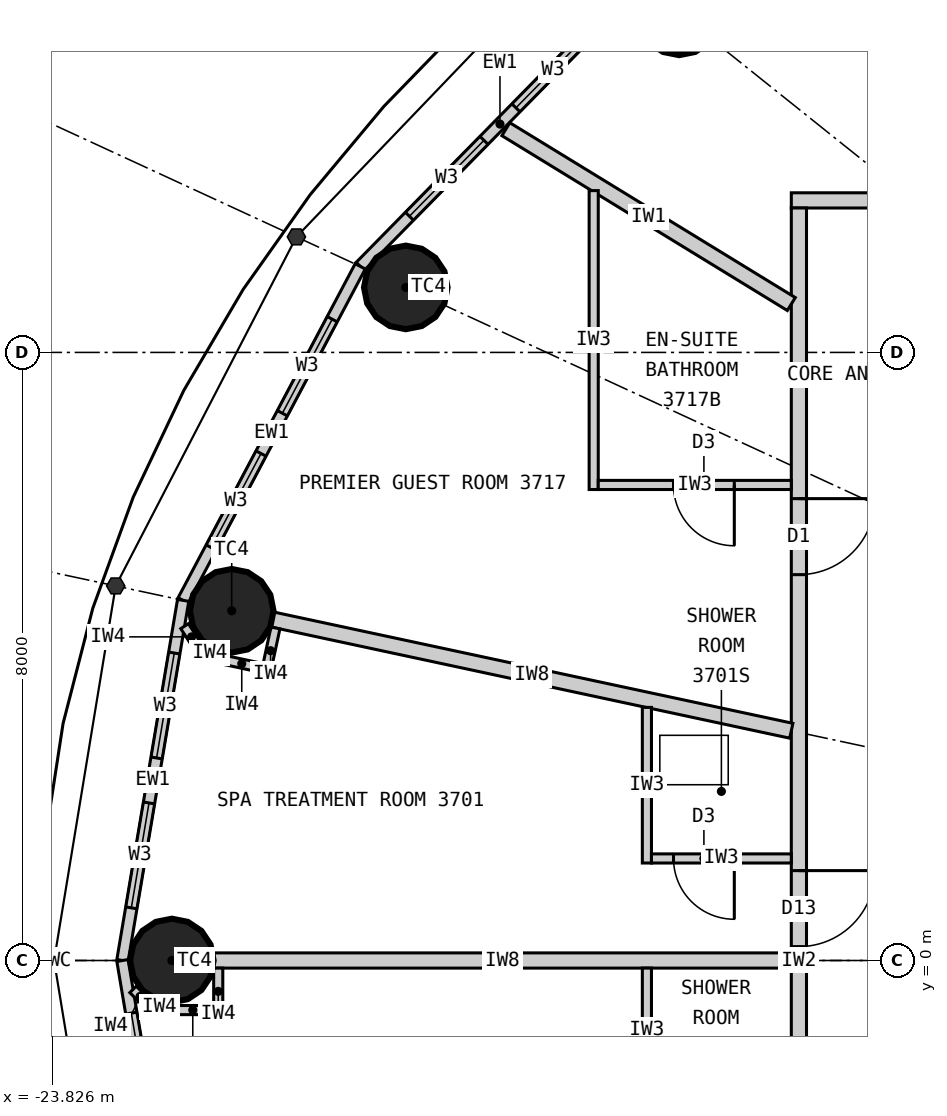
"""IFC4 building model, lengths in metres.
Left out: names, types, materials, properties, quantities, classifications, styles, units other than length and angle.
Written with IfcOpenShell. Run it as: python <this file> out.ifc"""

import sys

from ifc_helpers import new_model, si_unit, direction, frame, frame_2d, origin, origin_2d, place, context, subcontext, project, spatial, rectangle, circle, extrude, element, fill, save


model = new_model("IFC4")
c1 = context("Model", 3, precision=1e-05, world=origin(), true_north=direction((0.0, 1.0)))
c2 = subcontext(c1, "Body", "Model", "MODEL_VIEW")
j1 = project(units=[si_unit("LENGTHUNIT", "METRE"), si_unit("PLANEANGLEUNIT", "RADIAN")], contexts=[c1])
p1 = place(None, origin())
s1 = spatial("IfcSite", under=j1, at=p1, CompositionType="ELEMENT")
p2 = place(p1, origin())
s2 = spatial("IfcBuilding", under=s1, at=p2, CompositionType="ELEMENT")
p3 = place(p2, frame((0.0, 0.0, 143.4)))
s3 = spatial("IfcBuildingStorey", under=s2, at=p3, CompositionType="ELEMENT", Elevation=143.4)
for number, where, z_axis, x_axis in (
    (1, (-15.576, 12.461, 0.0), (0.0, 0.0, 1.0), (1.0, 0.0, 0.0)),
    (2, (-19.172, 8.855, 0.0), (0.0, 0.0, 1.0), (1.0, 0.0, 0.0)),
    (3, (-21.463, 4.601, 0.0), (0.0, 0.0, 1.0), (1.0, 0.0, 0.0)),
    (4, (-22.25, 0.0, 0.0), (0.0, 0.0, 1.0), (1.0, 0.0, 0.0)),
):
    element("IfcColumn", number, at=place(p3, frame(where, z_axis=z_axis, x_axis=x_axis)), inside=s3, PredefinedType="COLUMN", context=c2, shape_type="SweptSolid", body=[
        extrude(circle(Radius=0.55, at=origin_2d()), origin(), (0.0, 0.0, 1.0), 3.3),
    ])
p4 = place(p3, frame((-16.095, 12.876, 0.0), z_axis=(0.0, 0.0, 1.0), x_axis=(-0.700727467776, -0.71342905457, 0.0)))
e5 = element("IfcWall", 5, at=p4, inside=s3, PredefinedType="ELEMENTEDWALL", context=c2, shape_type="SweptSolid", body=[
    extrude(rectangle(XDim=5.247, YDim=0.15, at=frame_2d((2.624, 0.0))), origin(), (0.0, 0.0, 1.0), 3.12),
])
p5 = place(p4, frame((0.924, 0.0, 0.9)))
e6 = element("IfcOpeningElement", 6, at=p5, cuts=e5, PredefinedType="OPENING", context=c2, shape_type="SweptSolid", body=[
    extrude(rectangle(XDim=1.4, YDim=1.9, at=frame_2d((0.7, 0.95))), frame((0.0, 0.085, 0.0), z_axis=(0.0, -1.0, 0.0), x_axis=(1.0, 0.0, 0.0)), (0.0, 0.0, 1.0), 0.17),
])
p6 = place(p4, frame((2.924, 0.0, 0.9)))
e7 = element("IfcOpeningElement", 7, at=p6, cuts=e5, PredefinedType="OPENING", context=c2, shape_type="SweptSolid", body=[
    extrude(rectangle(XDim=1.4, YDim=1.9, at=frame_2d((0.7, 0.95))), frame((0.0, 0.085, 0.0), z_axis=(0.0, -1.0, 0.0), x_axis=(1.0, 0.0, 0.0)), (0.0, 0.0, 1.0), 0.17),
])
p7 = place(p3, frame((-19.772, 9.132, 0.0), z_axis=(0.0, 0.0, 1.0), x_axis=(-0.468428906714, -0.883501193748, 0.0)))
e8 = element("IfcWall", 8, at=p7, inside=s3, PredefinedType="ELEMENTEDWALL", context=c2, shape_type="SweptSolid", body=[
    extrude(rectangle(XDim=4.974, YDim=0.15, at=frame_2d((2.487, 0.0))), origin(), (0.0, 0.0, 1.0), 3.12),
])
p8 = place(p7, frame((0.787, 0.0, 0.9)))
e9 = element("IfcOpeningElement", 9, at=p8, cuts=e8, PredefinedType="OPENING", context=c2, shape_type="SweptSolid", body=[
    extrude(rectangle(XDim=1.4, YDim=1.9, at=frame_2d((0.7, 0.95))), frame((0.0, 0.085, 0.0), z_axis=(0.0, -1.0, 0.0), x_axis=(1.0, 0.0, 0.0)), (0.0, 0.0, 1.0), 0.17),
])
p9 = place(p7, frame((2.787, 0.0, 0.9)))
e10 = element("IfcOpeningElement", 10, at=p9, cuts=e8, PredefinedType="OPENING", context=c2, shape_type="SweptSolid", body=[
    extrude(rectangle(XDim=1.4, YDim=1.9, at=frame_2d((0.7, 0.95))), frame((0.0, 0.085, 0.0), z_axis=(0.0, -1.0, 0.0), x_axis=(1.0, 0.0, 0.0)), (0.0, 0.0, 1.0), 0.17),
])
p10 = place(p3, frame((-22.102, 4.738, 0.0), z_axis=(0.0, 0.0, 1.0), x_axis=(-0.166162111254, -0.986098449843, 0.0)))
e11 = element("IfcWall", 11, at=p10, inside=s3, PredefinedType="ELEMENTEDWALL", context=c2, shape_type="SweptSolid", body=[
    extrude(rectangle(XDim=4.805, YDim=0.15, at=frame_2d((2.402, 0.0))), origin(), (0.0, 0.0, 1.0), 3.12),
])
p11 = place(p10, frame((0.702, 0.0, 0.9)))
e12 = element("IfcOpeningElement", 12, at=p11, cuts=e11, PredefinedType="OPENING", context=c2, shape_type="SweptSolid", body=[
    extrude(rectangle(XDim=1.4, YDim=1.9, at=frame_2d((0.7, 0.95))), frame((0.0, 0.085, 0.0), z_axis=(0.0, -1.0, 0.0), x_axis=(1.0, 0.0, 0.0)), (0.0, 0.0, 1.0), 0.17),
])
p12 = place(p10, frame((2.702, 0.0, 0.9)))
e13 = element("IfcOpeningElement", 13, at=p12, cuts=e11, PredefinedType="OPENING", context=c2, shape_type="SweptSolid", body=[
    extrude(rectangle(XDim=1.4, YDim=1.9, at=frame_2d((0.7, 0.95))), frame((0.0, 0.085, 0.0), z_axis=(0.0, -1.0, 0.0), x_axis=(1.0, 0.0, 0.0)), (0.0, 0.0, 1.0), 0.17),
])
p13 = place(p3, frame((-22.9, 0.0, 0.0), z_axis=(0.0, 0.0, 1.0), x_axis=(0.166162111254, -0.986098449843, 0.0)))
e14 = element("IfcWall", 14, at=p13, inside=s3, PredefinedType="ELEMENTEDWALL", context=c2, shape_type="SweptSolid", body=[
    extrude(rectangle(XDim=4.805, YDim=0.15, at=frame_2d((2.402, 0.0))), origin(), (0.0, 0.0, 1.0), 3.12),
])
p14 = place(p13, frame((0.702, 0.0, 0.9)))
e15 = element("IfcOpeningElement", 15, at=p14, cuts=e14, PredefinedType="OPENING", context=c2, shape_type="SweptSolid", body=[
    extrude(rectangle(XDim=1.4, YDim=1.9, at=frame_2d((0.7, 0.95))), frame((0.0, 0.085, 0.0), z_axis=(0.0, -1.0, 0.0), x_axis=(1.0, 0.0, 0.0)), (0.0, 0.0, 1.0), 0.17),
])
p15 = place(p13, frame((2.702, 0.0, 0.9)))
e16 = element("IfcOpeningElement", 16, at=p15, cuts=e14, PredefinedType="OPENING", context=c2, shape_type="SweptSolid", body=[
    extrude(rectangle(XDim=1.4, YDim=1.9, at=frame_2d((0.7, 0.95))), frame((0.0, 0.085, 0.0), z_axis=(0.0, -1.0, 0.0), x_axis=(1.0, 0.0, 0.0)), (0.0, 0.0, 1.0), 0.17),
])
p16 = place(p3, frame((-14.1, 10.0, 0.0), z_axis=(0.0, 0.0, 1.0), x_axis=(1.0, 0.0, 0.0)))
e17 = element("IfcWall", 17, at=p16, inside=s3, PredefinedType="PARTITIONING", context=c2, shape_type="SweptSolid", body=[
    extrude(rectangle(XDim=28.2, YDim=0.2, at=frame_2d((14.1, 0.0))), origin(), (0.0, 0.0, 1.0), 3.12),
])
p17 = place(p16, frame((23.045, 0.0, 0.0)))
e18 = element("IfcOpeningElement", 18, at=p17, cuts=e17, PredefinedType="OPENING", context=c2, shape_type="SweptSolid", body=[
    extrude(rectangle(XDim=1.0, YDim=2.2, at=frame_2d((0.5, 1.1))), frame((0.0, 0.11, 0.0), z_axis=(0.0, -1.0, 0.0), x_axis=(1.0, 0.0, 0.0)), (0.0, 0.0, 1.0), 0.22),
])
p18 = place(p16, frame((17.829, 0.0, 0.0)))
e19 = element("IfcOpeningElement", 19, at=p18, cuts=e17, PredefinedType="OPENING", context=c2, shape_type="SweptSolid", body=[
    extrude(rectangle(XDim=1.0, YDim=2.2, at=frame_2d((0.5, 1.1))), frame((0.0, 0.11, 0.0), z_axis=(0.0, -1.0, 0.0), x_axis=(1.0, 0.0, 0.0)), (0.0, 0.0, 1.0), 0.22),
])
p19 = place(p16, frame((12.205, 0.0, 0.0)))
e20 = element("IfcOpeningElement", 20, at=p19, cuts=e17, PredefinedType="OPENING", context=c2, shape_type="SweptSolid", body=[
    extrude(rectangle(XDim=1.0, YDim=2.2, at=frame_2d((0.5, 1.1))), frame((0.0, 0.11, 0.0), z_axis=(0.0, -1.0, 0.0), x_axis=(1.0, 0.0, 0.0)), (0.0, 0.0, 1.0), 0.22),
])
p20 = place(p16, frame((7.857, 0.0, 0.0)))
e21 = element("IfcOpeningElement", 21, at=p20, cuts=e17, PredefinedType="OPENING", context=c2, shape_type="SweptSolid", body=[
    extrude(rectangle(XDim=1.0, YDim=2.2, at=frame_2d((0.5, 1.1))), frame((0.0, 0.11, 0.0), z_axis=(0.0, -1.0, 0.0), x_axis=(1.0, 0.0, 0.0)), (0.0, 0.0, 1.0), 0.22),
])
p21 = place(p16, frame((2.801, 0.0, 0.0)))
e22 = element("IfcOpeningElement", 22, at=p21, cuts=e17, PredefinedType="OPENING", context=c2, shape_type="SweptSolid", body=[
    extrude(rectangle(XDim=1.0, YDim=2.2, at=frame_2d((0.5, 1.1))), frame((0.0, 0.11, 0.0), z_axis=(0.0, -1.0, 0.0), x_axis=(1.0, 0.0, 0.0)), (0.0, 0.0, 1.0), 0.22),
])
p22 = place(p3, frame((-14.0, 9.9, 0.0), z_axis=(0.0, 0.0, 1.0), x_axis=(0.0, -1.0, 0.0)))
e23 = element("IfcWall", 23, at=p22, inside=s3, PredefinedType="PARTITIONING", context=c2, shape_type="SweptSolid", body=[
    extrude(rectangle(XDim=19.8, YDim=0.2, at=frame_2d((9.9, 0.0))), origin(), (0.0, 0.0, 1.0), 3.12),
])
p23 = place(p22, frame((8.718, 0.0, 0.0)))
e24 = element("IfcOpeningElement", 24, at=p23, cuts=e23, PredefinedType="OPENING", context=c2, shape_type="SweptSolid", body=[
    extrude(rectangle(XDim=1.0, YDim=2.2, at=frame_2d((0.5, 1.1))), frame((0.0, 0.11, 0.0), z_axis=(0.0, -1.0, 0.0), x_axis=(1.0, 0.0, 0.0)), (0.0, 0.0, 1.0), 0.22),
])
p24 = place(p22, frame((11.74, 0.0, 0.0)))
e25 = element("IfcOpeningElement", 25, at=p24, cuts=e23, PredefinedType="OPENING", context=c2, shape_type="SweptSolid", body=[
    extrude(rectangle(XDim=1.0, YDim=2.2, at=frame_2d((0.5, 1.1))), frame((0.0, 0.11, 0.0), z_axis=(0.0, -1.0, 0.0), x_axis=(1.0, 0.0, 0.0)), (0.0, 0.0, 1.0), 0.22),
])
p25 = place(p22, frame((14.782, 0.0, 0.0)))
e26 = element("IfcOpeningElement", 26, at=p25, cuts=e23, PredefinedType="OPENING", context=c2, shape_type="SweptSolid", body=[
    extrude(rectangle(XDim=1.0, YDim=2.2, at=frame_2d((0.5, 1.1))), frame((0.0, 0.11, 0.0), z_axis=(0.0, -1.0, 0.0), x_axis=(1.0, 0.0, 0.0)), (0.0, 0.0, 1.0), 0.22),
])
p26 = place(p22, frame((17.707, 0.0, 0.0)))
e27 = element("IfcOpeningElement", 27, at=p26, cuts=e23, PredefinedType="OPENING", context=c2, shape_type="SweptSolid", body=[
    extrude(rectangle(XDim=1.0, YDim=2.2, at=frame_2d((0.5, 1.1))), frame((0.0, 0.11, 0.0), z_axis=(0.0, -1.0, 0.0), x_axis=(1.0, 0.0, 0.0)), (0.0, 0.0, 1.0), 0.22),
])
p27 = place(p22, frame((3.824, 0.0, 0.0)))
e28 = element("IfcOpeningElement", 28, at=p27, cuts=e23, PredefinedType="OPENING", context=c2, shape_type="SweptSolid", body=[
    extrude(rectangle(XDim=1.0, YDim=2.2, at=frame_2d((0.5, 1.1))), frame((0.0, 0.11, 0.0), z_axis=(0.0, -1.0, 0.0), x_axis=(1.0, 0.0, 0.0)), (0.0, 0.0, 1.0), 0.22),
])
p28 = place(p3, frame((-14.1, 8.636, 0.0), z_axis=(0.0, 0.0, 1.0), x_axis=(-0.852731884196, 0.522348862041, 0.0)))
e29 = element("IfcWall", 29, at=p28, inside=s3, PredefinedType="PARTITIONING", context=c2, shape_type="SweptSolid", body=[
    extrude(rectangle(XDim=4.404, YDim=0.2, at=frame_2d((2.202, 0.0))), origin(), (0.0, 0.0, 1.0), 3.12),
])
p29 = place(p3, frame((-14.1, 3.022, 0.0), z_axis=(0.0, 0.0, 1.0), x_axis=(-0.977790639684, 0.209584028367, 0.0)))
e30 = element("IfcWall", 30, at=p29, inside=s3, PredefinedType="PARTITIONING", context=c2, shape_type="SweptSolid", body=[
    extrude(rectangle(XDim=6.98, YDim=0.2, at=frame_2d((3.49, 0.0))), origin(), (0.0, 0.0, 1.0), 2.27),
])
p30 = place(p3, frame((-14.1, 0.0, 0.0), z_axis=(0.0, 0.0, 1.0), x_axis=(-1.0, 0.0, 0.0)))
e31 = element("IfcWall", 31, at=p30, inside=s3, PredefinedType="PARTITIONING", context=c2, shape_type="SweptSolid", body=[
    extrude(rectangle(XDim=7.6, YDim=0.2, at=frame_2d((3.8, 0.0))), origin(), (0.0, 0.0, 1.0), 2.27),
])
p31 = place(p3, frame((-16.0, 3.33, 0.0), z_axis=(0.0, 0.0, 1.0), x_axis=(0.0, -1.0, 0.0)))
e32 = element("IfcWall", 32, at=p31, inside=s3, PredefinedType="PARTITIONING", context=c2, shape_type="SweptSolid", body=[
    extrude(rectangle(XDim=2.047, YDim=0.12, at=frame_2d((1.024, 0.0))), origin(), (0.0, 0.0, 1.0), 3.12),
])
p32 = place(p3, frame((-14.1, 1.343, 0.0), z_axis=(0.0, 0.0, 1.0), x_axis=(-1.0, 0.0, 0.0)))
e33 = element("IfcWall", 33, at=p32, inside=s3, PredefinedType="PARTITIONING", context=c2, shape_type="SweptSolid", body=[
    extrude(rectangle(XDim=1.84, YDim=0.12, at=frame_2d((0.92, 0.0))), origin(), (0.0, 0.0, 1.0), 3.12),
])
p33 = place(p32, frame((0.75, 0.0, 0.0)))
e34 = element("IfcOpeningElement", 34, at=p33, cuts=e33, PredefinedType="OPENING", context=c2, shape_type="SweptSolid", body=[
    extrude(rectangle(XDim=0.8, YDim=2.1, at=frame_2d((0.4, 1.05))), frame((0.0, 0.07, 0.0), z_axis=(0.0, -1.0, 0.0), x_axis=(1.0, 0.0, 0.0)), (0.0, 0.0, 1.0), 0.14),
])
p34 = place(p3, frame((-16.0, -0.1, 0.0), z_axis=(0.0, 0.0, 1.0), x_axis=(0.0, -1.0, 0.0)))
e35 = element("IfcWall", 35, at=p34, inside=s3, PredefinedType="PARTITIONING", context=c2, shape_type="SweptSolid", body=[
    extrude(rectangle(XDim=1.64, YDim=0.12, at=frame_2d((0.82, 0.0))), origin(), (0.0, 0.0, 1.0), 3.12),
])
p35 = place(p3, frame((-16.7, 10.129, 0.0), z_axis=(0.0, 0.0, 1.0), x_axis=(0.0, -1.0, 0.0)))
e36 = element("IfcWall", 36, at=p35, inside=s3, PredefinedType="PARTITIONING", context=c2, shape_type="SweptSolid", body=[
    extrude(rectangle(XDim=3.933, YDim=0.12, at=frame_2d((1.966, 0.0))), origin(), (0.0, 0.0, 1.0), 3.12),
])
p36 = place(p3, frame((-14.1, 6.256, 0.0), z_axis=(0.0, 0.0, 1.0), x_axis=(-1.0, 0.0, 0.0)))
e37 = element("IfcWall", 37, at=p36, inside=s3, PredefinedType="PARTITIONING", context=c2, shape_type="SweptSolid", body=[
    extrude(rectangle(XDim=2.54, YDim=0.12, at=frame_2d((1.27, 0.0))), origin(), (0.0, 0.0, 1.0), 3.12),
])
p37 = place(p36, frame((0.75, 0.0, 0.0)))
e38 = element("IfcOpeningElement", 38, at=p37, cuts=e37, PredefinedType="OPENING", context=c2, shape_type="SweptSolid", body=[
    extrude(rectangle(XDim=0.8, YDim=2.1, at=frame_2d((0.4, 1.05))), frame((0.0, 0.07, 0.0), z_axis=(0.0, -1.0, 0.0), x_axis=(1.0, 0.0, 0.0)), (0.0, 0.0, 1.0), 0.14),
])
p38 = place(p3, frame((-20.887, 4.375, 0.0), z_axis=(0.0, 0.0, 1.0), x_axis=(-0.209746941802, -0.977755705892, 0.0)))
e39 = element("IfcWall", 39, at=p38, inside=s3, PredefinedType="PARTITIONING", context=c2, shape_type="SweptSolid", body=[
    extrude(rectangle(XDim=0.612, YDim=0.12, at=frame_2d((0.306, 0.0))), origin(), (0.0, 0.0, 1.0), 3.12),
])
p39 = place(p3, frame((-21.062, 3.848, 0.0), z_axis=(0.0, 0.0, 1.0), x_axis=(-0.977789415726, 0.209589738521, 0.0)))
e40 = element("IfcWall", 40, at=p39, inside=s3, PredefinedType="PARTITIONING", context=c2, shape_type="SweptSolid", body=[
    extrude(rectangle(XDim=0.55, YDim=0.12, at=frame_2d((0.275, 0.0))), origin(), (0.0, 0.0, 1.0), 3.12),
])
p40 = place(p3, frame((-21.599, 3.963, 0.0), z_axis=(0.0, 0.0, 1.0), x_axis=(-0.890193602875, 0.455582428766, 0.0)))
e41 = element("IfcWall", 41, at=p40, inside=s3, PredefinedType="PARTITIONING", context=c2, shape_type="SweptSolid", body=[
    extrude(rectangle(XDim=0.338, YDim=0.12, at=frame_2d((0.169, 0.0))), origin(), (0.0, 0.0, 1.0), 3.12),
])
p41 = place(p3, frame((-21.9, 4.117, 0.0), z_axis=(0.0, 0.0, 1.0), x_axis=(-0.543582688681, 0.839355622228, 0.0)))
e42 = element("IfcWall", 42, at=p41, inside=s3, PredefinedType="PARTITIONING", context=c2, shape_type="SweptSolid", body=[
    extrude(rectangle(XDim=0.336, YDim=0.12, at=frame_2d((0.168, 0.0))), origin(), (0.0, 0.0, 1.0), 3.12),
])
p42 = place(p3, frame((-21.64, -0.1, 0.0), z_axis=(0.0, 0.0, 1.0), x_axis=(0.0, -1.0, 0.0)))
e43 = element("IfcWall", 43, at=p42, inside=s3, PredefinedType="PARTITIONING", context=c2, shape_type="SweptSolid", body=[
    extrude(rectangle(XDim=0.612, YDim=0.12, at=frame_2d((0.306, 0.0))), origin(), (0.0, 0.0, 1.0), 3.12),
])
p43 = place(p3, frame((-21.7, -0.652, 0.0), z_axis=(0.0, 0.0, 1.0), x_axis=(-1.0, 0.0, 0.0)))
e44 = element("IfcWall", 44, at=p43, inside=s3, PredefinedType="PARTITIONING", context=c2, shape_type="SweptSolid", body=[
    extrude(rectangle(XDim=0.55, YDim=0.12, at=frame_2d((0.275, 0.0))), origin(), (0.0, 0.0, 1.0), 3.12),
])
p44 = place(p3, frame((-22.25, -0.652, 0.0), z_axis=(0.0, 0.0, 1.0), x_axis=(-0.965922233104, 0.258832454679, 0.0)))
e45 = element("IfcWall", 45, at=p44, inside=s3, PredefinedType="PARTITIONING", context=c2, shape_type="SweptSolid", body=[
    extrude(rectangle(XDim=0.338, YDim=0.12, at=frame_2d((0.169, 0.0))), origin(), (0.0, 0.0, 1.0), 3.12),
])
p45 = place(p3, frame((-22.576, -0.565, 0.0), z_axis=(0.0, 0.0, 1.0), x_axis=(-0.706639272724, 0.707573980757, 0.0)))
e46 = element("IfcWall", 46, at=p45, inside=s3, PredefinedType="PARTITIONING", context=c2, shape_type="SweptSolid", body=[
    extrude(rectangle(XDim=0.261, YDim=0.12, at=frame_2d((0.131, 0.0))), origin(), (0.0, 0.0, 1.0), 3.12),
])
p46 = place(p5, origin())
e47 = element("IfcWindow", 47, at=p46, inside=s3, PartitioningType="SINGLE_PANEL", PredefinedType="WINDOW", context=c2, shape_type="SweptSolid", body=[
    extrude(rectangle(XDim=1.4, YDim=1.9, at=frame_2d((0.7, 0.95))), frame((0.0, 0.03, 0.0), z_axis=(0.0, -1.0, 0.0), x_axis=(1.0, 0.0, 0.0)), (0.0, 0.0, 1.0), 0.06),
])
fill(e6, e47)
p47 = place(p6, origin())
e48 = element("IfcWindow", 48, at=p47, inside=s3, PartitioningType="SINGLE_PANEL", PredefinedType="WINDOW", context=c2, shape_type="SweptSolid", body=[
    extrude(rectangle(XDim=1.4, YDim=1.9, at=frame_2d((0.7, 0.95))), frame((0.0, 0.03, 0.0), z_axis=(0.0, -1.0, 0.0), x_axis=(1.0, 0.0, 0.0)), (0.0, 0.0, 1.0), 0.06),
])
fill(e7, e48)
p48 = place(p8, origin())
e49 = element("IfcWindow", 49, at=p48, inside=s3, PartitioningType="SINGLE_PANEL", PredefinedType="WINDOW", context=c2, shape_type="SweptSolid", body=[
    extrude(rectangle(XDim=1.4, YDim=1.9, at=frame_2d((0.7, 0.95))), frame((0.0, 0.03, 0.0), z_axis=(0.0, -1.0, 0.0), x_axis=(1.0, 0.0, 0.0)), (0.0, 0.0, 1.0), 0.06),
])
fill(e9, e49)
p49 = place(p9, origin())
e50 = element("IfcWindow", 50, at=p49, inside=s3, PartitioningType="SINGLE_PANEL", PredefinedType="WINDOW", context=c2, shape_type="SweptSolid", body=[
    extrude(rectangle(XDim=1.4, YDim=1.9, at=frame_2d((0.7, 0.95))), frame((0.0, 0.03, 0.0), z_axis=(0.0, -1.0, 0.0), x_axis=(1.0, 0.0, 0.0)), (0.0, 0.0, 1.0), 0.06),
])
fill(e10, e50)
p50 = place(p11, origin())
e51 = element("IfcWindow", 51, at=p50, inside=s3, PartitioningType="SINGLE_PANEL", PredefinedType="WINDOW", context=c2, shape_type="SweptSolid", body=[
    extrude(rectangle(XDim=1.4, YDim=1.9, at=frame_2d((0.7, 0.95))), frame((0.0, 0.03, 0.0), z_axis=(0.0, -1.0, 0.0), x_axis=(1.0, 0.0, 0.0)), (0.0, 0.0, 1.0), 0.06),
])
fill(e12, e51)
p51 = place(p12, origin())
e52 = element("IfcWindow", 52, at=p51, inside=s3, PartitioningType="SINGLE_PANEL", PredefinedType="WINDOW", context=c2, shape_type="SweptSolid", body=[
    extrude(rectangle(XDim=1.4, YDim=1.9, at=frame_2d((0.7, 0.95))), frame((0.0, 0.03, 0.0), z_axis=(0.0, -1.0, 0.0), x_axis=(1.0, 0.0, 0.0)), (0.0, 0.0, 1.0), 0.06),
])
fill(e13, e52)
p52 = place(p14, origin())
e53 = element("IfcWindow", 53, at=p52, inside=s3, PartitioningType="SINGLE_PANEL", PredefinedType="WINDOW", context=c2, shape_type="SweptSolid", body=[
    extrude(rectangle(XDim=1.4, YDim=1.9, at=frame_2d((0.7, 0.95))), frame((0.0, 0.03, 0.0), z_axis=(0.0, -1.0, 0.0), x_axis=(1.0, 0.0, 0.0)), (0.0, 0.0, 1.0), 0.06),
])
fill(e15, e53)
p53 = place(p33, origin())
e54 = element("IfcDoor", 54, at=p53, inside=s3, OperationType="SINGLE_SWING_LEFT", PredefinedType="DOOR", context=c2, shape_type="SweptSolid", body=[
    extrude(rectangle(XDim=0.8, YDim=2.1, at=frame_2d((0.4, 1.05))), frame((0.0, 0.025, 0.0), z_axis=(0.0, -1.0, 0.0), x_axis=(1.0, 0.0, 0.0)), (0.0, 0.0, 1.0), 0.05),
])
fill(e34, e54)
p54 = place(p23, origin())
e55 = element("IfcDoor", 55, at=p54, inside=s3, OperationType="SINGLE_SWING_LEFT", PredefinedType="DOOR", context=c2, shape_type="SweptSolid", body=[
    extrude(rectangle(XDim=1.0, YDim=2.2, at=frame_2d((0.5, 1.1))), frame((0.0, 0.025, 0.0), z_axis=(0.0, -1.0, 0.0), x_axis=(1.0, 0.0, 0.0)), (0.0, 0.0, 1.0), 0.05),
])
fill(e24, e55)
p55 = place(p37, origin())
e56 = element("IfcDoor", 56, at=p55, inside=s3, OperationType="SINGLE_SWING_LEFT", PredefinedType="DOOR", context=c2, shape_type="SweptSolid", body=[
    extrude(rectangle(XDim=0.8, YDim=2.1, at=frame_2d((0.4, 1.05))), frame((0.0, 0.025, 0.0), z_axis=(0.0, -1.0, 0.0), x_axis=(1.0, 0.0, 0.0)), (0.0, 0.0, 1.0), 0.05),
])
fill(e38, e56)
p56 = place(p27, origin())
e57 = element("IfcDoor", 57, at=p56, inside=s3, OperationType="SINGLE_SWING_LEFT", PredefinedType="DOOR", context=c2, shape_type="SweptSolid", body=[
    extrude(rectangle(XDim=1.0, YDim=2.2, at=frame_2d((0.5, 1.1))), frame((0.0, 0.025, 0.0), z_axis=(0.0, -1.0, 0.0), x_axis=(1.0, 0.0, 0.0)), (0.0, 0.0, 1.0), 0.05),
])
fill(e28, e57)
save(model, sys.argv[1])
